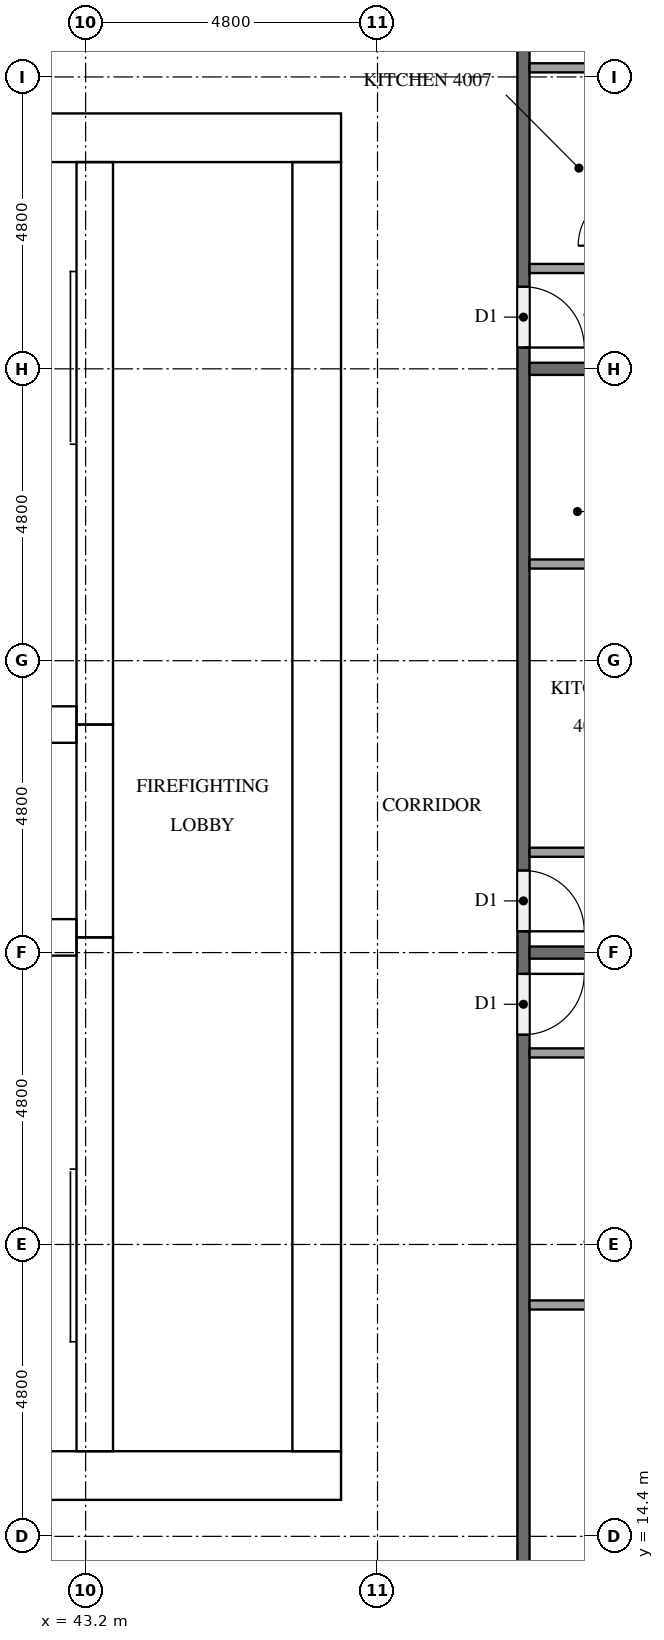
"""IFC4 building model, lengths in metres.
Left out: names, types, materials, properties, quantities, classifications, styles, units other than length and angle.
Written with IfcOpenShell. Run it as: python <this file> out.ifc"""

import sys

from ifc_helpers import new_model, si_unit, direction, frame, frame_2d, origin, place, context, subcontext, project, spatial, rectangle, extrude, element, fill, save


model = new_model("IFC4")
c1 = context("Model", 3, precision=1e-05, world=origin(), true_north=direction((0.0, 1.0)))
c2 = subcontext(c1, "Body", "Model", "MODEL_VIEW")
j1 = project(units=[si_unit("LENGTHUNIT", "METRE"), si_unit("PLANEANGLEUNIT", "RADIAN")], contexts=[c1])
p1 = place(None, origin())
s1 = spatial("IfcSite", under=j1, at=p1, CompositionType="ELEMENT")
p2 = place(p1, origin())
s2 = spatial("IfcBuilding", under=s1, at=p2, CompositionType="ELEMENT")
p3 = place(p2, frame((0.0, 0.0, 156.0)))
s3 = spatial("IfcBuildingStorey", under=s2, at=p3, CompositionType="ELEMENT", Elevation=156.0)
p4 = place(p3, frame((15.0, 15.4, 0.0), z_axis=(0.0, 0.0, 1.0), x_axis=(1.0, 0.0, 0.0)))
e1 = element("IfcWall", 1, at=p4, inside=s3, PredefinedType="SHEAR", context=c2, shape_type="SweptSolid", body=[
    extrude(rectangle(XDim=32.4, YDim=0.8, at=frame_2d((16.2, 0.0))), origin(), (0.0, 0.0, 1.0), 3.2),
])
p5 = place(p4, frame((15.3, 0.0, 0.0)))
e2 = element("IfcOpeningElement", 2, at=p5, cuts=e1, PredefinedType="OPENING", context=c2, shape_type="SweptSolid", body=[
    extrude(rectangle(XDim=1.8, YDim=2.1, at=frame_2d((0.9, 1.05))), frame((0.0, 0.41, 0.0), z_axis=(0.0, -1.0, 0.0), x_axis=(1.0, 0.0, 0.0)), (0.0, 0.0, 1.0), 0.82),
])
p6 = place(p3, frame((15.0, 37.4, 0.0), z_axis=(0.0, 0.0, 1.0), x_axis=(1.0, 0.0, 0.0)))
e3 = element("IfcWall", 3, at=p6, inside=s3, PredefinedType="SHEAR", context=c2, shape_type="SweptSolid", body=[
    extrude(rectangle(XDim=32.4, YDim=0.8, at=frame_2d((16.2, 0.0))), origin(), (0.0, 0.0, 1.0), 3.2),
])
p7 = place(p6, frame((15.3, 0.0, 0.0)))
e4 = element("IfcOpeningElement", 4, at=p7, cuts=e3, PredefinedType="OPENING", context=c2, shape_type="SweptSolid", body=[
    extrude(rectangle(XDim=1.8, YDim=2.1, at=frame_2d((0.9, 1.05))), frame((0.0, 0.41, 0.0), z_axis=(0.0, -1.0, 0.0), x_axis=(1.0, 0.0, 0.0)), (0.0, 0.0, 1.0), 0.82),
])
p8 = place(p6, frame((1.51, 0.0, 0.0)))
e5 = element("IfcOpeningElement", 5, at=p8, cuts=e3, PredefinedType="OPENING", context=c2, shape_type="SweptSolid", body=[
    extrude(rectangle(XDim=1.0, YDim=2.1, at=frame_2d((0.5, 1.05))), frame((0.0, 0.41, 0.0), z_axis=(0.0, -1.0, 0.0), x_axis=(1.0, 0.0, 0.0)), (0.0, 0.0, 1.0), 0.82),
])
p9 = place(p6, frame((5.11, 0.0, 0.0)))
e6 = element("IfcOpeningElement", 6, at=p9, cuts=e3, PredefinedType="OPENING", context=c2, shape_type="SweptSolid", body=[
    extrude(rectangle(XDim=1.0, YDim=2.1, at=frame_2d((0.5, 1.05))), frame((0.0, 0.41, 0.0), z_axis=(0.0, -1.0, 0.0), x_axis=(1.0, 0.0, 0.0)), (0.0, 0.0, 1.0), 0.82),
])
p10 = place(p3, frame((47.0, 15.8, 0.0), z_axis=(0.0, 0.0, 1.0), x_axis=(0.0, 1.0, 0.0)))
e7 = element("IfcWall", 7, at=p10, inside=s3, PredefinedType="SHEAR", context=c2, shape_type="SweptSolid", body=[
    extrude(rectangle(XDim=21.2, YDim=0.8, at=frame_2d((10.6, 0.0))), origin(), (0.0, 0.0, 1.0), 3.2),
])
p11 = place(p10, frame((10.3, 0.0, 0.0)))
e8 = element("IfcOpeningElement", 8, at=p11, cuts=e7, PredefinedType="OPENING", context=c2, shape_type="SweptSolid", body=[
    extrude(rectangle(XDim=1.2, YDim=2.1, at=frame_2d((0.6, 1.05))), frame((0.0, 0.41, 0.0), z_axis=(0.0, -1.0, 0.0), x_axis=(1.0, 0.0, 0.0)), (0.0, 0.0, 1.0), 0.82),
])
p12 = place(p3, frame((43.35, 15.8, 0.0), z_axis=(0.0, 0.0, 1.0), x_axis=(0.0, 1.0, 0.0)))
e9 = element("IfcWall", 9, at=p12, inside=s3, PredefinedType="SHEAR", context=c2, shape_type="SweptSolid", body=[
    extrude(rectangle(XDim=8.45, YDim=0.6, at=frame_2d((4.225, 0.0))), origin(), (0.0, 0.0, 1.0), 3.2),
])
p13 = place(p12, frame((0.4, 0.0, 0.0)))
e10 = element("IfcOpeningElement", 10, at=p13, cuts=e9, PredefinedType="OPENING", context=c2, shape_type="SweptSolid", body=[
    extrude(rectangle(XDim=1.2, YDim=2.1, at=frame_2d((0.6, 1.05))), frame((0.0, 0.31, 0.0), z_axis=(0.0, -1.0, 0.0), x_axis=(1.0, 0.0, 0.0)), (0.0, 0.0, 1.0), 0.62),
])
p14 = place(p3, frame((43.35, 24.25, 0.0), z_axis=(0.0, 0.0, 1.0), x_axis=(0.0, 1.0, 0.0)))
e11 = element("IfcWall", 11, at=p14, inside=s3, PredefinedType="SHEAR", context=c2, shape_type="SweptSolid", body=[
    extrude(rectangle(XDim=3.5, YDim=0.6, at=frame_2d((1.75, 0.0))), origin(), (0.0, 0.0, 1.0), 3.2),
])
p15 = place(p14, frame((1.2, 0.0, 0.0)))
e12 = element("IfcOpeningElement", 12, at=p15, cuts=e11, PredefinedType="OPENING", context=c2, shape_type="SweptSolid", body=[
    extrude(rectangle(XDim=1.1, YDim=2.1, at=frame_2d((0.55, 1.05))), frame((0.0, 0.31, 0.0), z_axis=(0.0, -1.0, 0.0), x_axis=(1.0, 0.0, 0.0)), (0.0, 0.0, 1.0), 0.62),
])
p16 = place(p3, frame((43.35, 27.75, 0.0), z_axis=(0.0, 0.0, 1.0), x_axis=(0.0, 1.0, 0.0)))
e13 = element("IfcWall", 13, at=p16, inside=s3, PredefinedType="SHEAR", context=c2, shape_type="SweptSolid", body=[
    extrude(rectangle(XDim=9.25, YDim=0.6, at=frame_2d((4.625, 0.0))), origin(), (0.0, 0.0, 1.0), 3.2),
])
p17 = place(p16, frame((7.65, 0.0, 0.0)))
e14 = element("IfcOpeningElement", 14, at=p17, cuts=e13, PredefinedType="OPENING", context=c2, shape_type="SweptSolid", body=[
    extrude(rectangle(XDim=1.2, YDim=2.1, at=frame_2d((0.6, 1.05))), frame((0.0, 0.31, 0.0), z_axis=(0.0, -1.0, 0.0), x_axis=(1.0, 0.0, 0.0)), (0.0, 0.0, 1.0), 0.62),
])
for number, where, z_axis, x_axis in (
    (15, (39.6, 24.25, 0.0), (0.0, 0.0, 1.0), (1.0, 0.0, 0.0)),
    (16, (39.6, 27.75, 0.0), (0.0, 0.0, 1.0), (1.0, 0.0, 0.0)),
):
    element("IfcWall", number, at=place(p3, frame(where, z_axis=z_axis, x_axis=x_axis)), inside=s3, PredefinedType="SHEAR", context=c2, shape_type="SweptSolid", body=[
        extrude(rectangle(XDim=3.45, YDim=0.6, at=frame_2d((1.725, 0.0))), origin(), (0.0, 0.0, 1.0), 3.2),
    ])
p18 = place(p3, frame((50.4, 40.7, 0.0), z_axis=(0.0, 0.0, 1.0), x_axis=(0.0, -1.0, 0.0)))
e17 = element("IfcWall", 17, at=p18, inside=s3, PredefinedType="PARTITIONING", context=c2, shape_type="SweptSolid", body=[
    extrude(rectangle(XDim=28.6, YDim=0.2, at=frame_2d((14.3, 0.0))), origin(), (0.0, 0.0, 1.0), 3.2),
])
p19 = place(p18, frame((17.05, 0.0, 0.0)))
e18 = element("IfcOpeningElement", 18, at=p19, cuts=e17, PredefinedType="OPENING", context=c2, shape_type="SweptSolid", body=[
    extrude(rectangle(XDim=1.0, YDim=2.1, at=frame_2d((0.5, 1.05))), frame((0.0, 0.11, 0.0), z_axis=(0.0, -1.0, 0.0), x_axis=(1.0, 0.0, 0.0)), (0.0, 0.0, 1.0), 0.22),
])
p20 = place(p18, frame((15.35, 0.0, 0.0)))
e19 = element("IfcOpeningElement", 19, at=p20, cuts=e17, PredefinedType="OPENING", context=c2, shape_type="SweptSolid", body=[
    extrude(rectangle(XDim=1.0, YDim=2.1, at=frame_2d((0.5, 1.05))), frame((0.0, 0.11, 0.0), z_axis=(0.0, -1.0, 0.0), x_axis=(1.0, 0.0, 0.0)), (0.0, 0.0, 1.0), 0.22),
])
p21 = place(p18, frame((5.75, 0.0, 0.0)))
e20 = element("IfcOpeningElement", 20, at=p21, cuts=e17, PredefinedType="OPENING", context=c2, shape_type="SweptSolid", body=[
    extrude(rectangle(XDim=1.0, YDim=2.1, at=frame_2d((0.5, 1.05))), frame((0.0, 0.11, 0.0), z_axis=(0.0, -1.0, 0.0), x_axis=(1.0, 0.0, 0.0)), (0.0, 0.0, 1.0), 0.22),
])
for number, where, z_axis, x_axis in (
    (21, (50.5, 24.0, 0.0), (0.0, 0.0, 1.0), (1.0, 0.0, 0.0)),
    (22, (50.5, 33.6, 0.0), (0.0, 0.0, 1.0), (1.0, 0.0, 0.0)),
):
    element("IfcWall", number, at=place(p3, frame(where, z_axis=z_axis, x_axis=x_axis)), inside=s3, PredefinedType="PARTITIONING", context=c2, shape_type="SweptSolid", body=[
        extrude(rectangle(XDim=6.725, YDim=0.2, at=frame_2d((3.363, 0.0))), origin(), (0.0, 0.0, 1.0), 3.2),
    ])
p22 = place(p3, frame((50.5, 18.205, 0.0), z_axis=(0.0, 0.0, 1.0), x_axis=(1.0, 0.0, 0.0)))
e23 = element("IfcWall", 23, at=p22, inside=s3, PredefinedType="PARTITIONING", context=c2, shape_type="SweptSolid", body=[
    extrude(rectangle(XDim=1.925, YDim=0.15, at=frame_2d((0.962, 0.0))), origin(), (0.0, 0.0, 1.0), 3.2),
])
for number, where, z_axis, x_axis in (
    (24, (50.5, 22.35, 0.0), (0.0, 0.0, 1.0), (1.0, 0.0, 0.0)),
    (25, (50.5, 30.39, 0.0), (0.0, 0.0, 1.0), (1.0, 0.0, 0.0)),
):
    element("IfcWall", number, at=place(p3, frame(where, z_axis=z_axis, x_axis=x_axis)), inside=s3, PredefinedType="PARTITIONING", context=c2, shape_type="SweptSolid", body=[
        extrude(rectangle(XDim=2.075, YDim=0.15, at=frame_2d((1.038, 0.0))), origin(), (0.0, 0.0, 1.0), 3.2),
    ])
p23 = place(p3, frame((50.5, 25.65, 0.0), z_axis=(0.0, 0.0, 1.0), x_axis=(1.0, 0.0, 0.0)))
e26 = element("IfcWall", 26, at=p23, inside=s3, PredefinedType="PARTITIONING", context=c2, shape_type="SweptSolid", body=[
    extrude(rectangle(XDim=2.225, YDim=0.15, at=frame_2d((1.113, 0.0))), origin(), (0.0, 0.0, 1.0), 3.2),
])
p24 = place(p3, frame((50.5, 38.55, 0.0), z_axis=(0.0, 0.0, 1.0), x_axis=(1.0, 0.0, 0.0)))
e27 = element("IfcWall", 27, at=p24, inside=s3, PredefinedType="PARTITIONING", context=c2, shape_type="SweptSolid", body=[
    extrude(rectangle(XDim=1.625, YDim=0.15, at=frame_2d((0.812, 0.0))), origin(), (0.0, 0.0, 1.0), 3.2),
])
p25 = place(p3, frame((50.5, 35.25, 0.0), z_axis=(0.0, 0.0, 1.0), x_axis=(1.0, 0.0, 0.0)))
e28 = element("IfcWall", 28, at=p25, inside=s3, PredefinedType="PARTITIONING", context=c2, shape_type="SweptSolid", body=[
    extrude(rectangle(XDim=1.775, YDim=0.15, at=frame_2d((0.887, 0.0))), origin(), (0.0, 0.0, 1.0), 3.2),
])
p26 = place(p15, origin())
e29 = element("IfcDoor", 29, at=p26, inside=s3, OperationType="DOUBLE_DOOR_SLIDING", PredefinedType="DOOR", context=c2, shape_type="SweptSolid", body=[
    extrude(rectangle(XDim=1.1, YDim=2.1, at=frame_2d((0.55, 1.05))), frame((0.0, 0.025, 0.0), z_axis=(0.0, -1.0, 0.0), x_axis=(1.0, 0.0, 0.0)), (0.0, 0.0, 1.0), 0.05),
])
fill(e12, e29)
p27 = place(p13, origin())
e30 = element("IfcDoor", 30, at=p27, inside=s3, OperationType="SINGLE_SWING_LEFT", PredefinedType="DOOR", context=c2, shape_type="SweptSolid", body=[
    extrude(rectangle(XDim=1.2, YDim=2.1, at=frame_2d((0.6, 1.05))), frame((0.0, 0.025, 0.0), z_axis=(0.0, -1.0, 0.0), x_axis=(1.0, 0.0, 0.0)), (0.0, 0.0, 1.0), 0.05),
])
fill(e10, e30)
p28 = place(p17, origin())
e31 = element("IfcDoor", 31, at=p28, inside=s3, OperationType="SINGLE_SWING_RIGHT", PredefinedType="DOOR", context=c2, shape_type="SweptSolid", body=[
    extrude(rectangle(XDim=1.2, YDim=2.1, at=frame_2d((0.6, 1.05))), frame((0.0, 0.025, 0.0), z_axis=(0.0, -1.0, 0.0), x_axis=(1.0, 0.0, 0.0)), (0.0, 0.0, 1.0), 0.05),
])
fill(e14, e31)
p29 = place(p11, origin())
e32 = element("IfcDoor", 32, at=p29, inside=s3, OperationType="SINGLE_SWING_RIGHT", PredefinedType="DOOR", context=c2, shape_type="SweptSolid", body=[
    extrude(rectangle(XDim=1.2, YDim=2.1, at=frame_2d((0.6, 1.05))), frame((0.0, 0.025, 0.0), z_axis=(0.0, -1.0, 0.0), x_axis=(1.0, 0.0, 0.0)), (0.0, 0.0, 1.0), 0.05),
])
fill(e8, e32)
p30 = place(p19, origin())
e33 = element("IfcDoor", 33, at=p30, inside=s3, OperationType="SINGLE_SWING_LEFT", PredefinedType="DOOR", context=c2, shape_type="SweptSolid", body=[
    extrude(rectangle(XDim=1.0, YDim=2.1, at=frame_2d((0.5, 1.05))), frame((0.0, 0.025, 0.0), z_axis=(0.0, -1.0, 0.0), x_axis=(1.0, 0.0, 0.0)), (0.0, 0.0, 1.0), 0.05),
])
fill(e18, e33)
p31 = place(p20, origin())
e34 = element("IfcDoor", 34, at=p31, inside=s3, OperationType="SINGLE_SWING_RIGHT", PredefinedType="DOOR", context=c2, shape_type="SweptSolid", body=[
    extrude(rectangle(XDim=1.0, YDim=2.1, at=frame_2d((0.5, 1.05))), frame((0.0, 0.025, 0.0), z_axis=(0.0, -1.0, 0.0), x_axis=(1.0, 0.0, 0.0)), (0.0, 0.0, 1.0), 0.05),
])
fill(e19, e34)
p32 = place(p21, origin())
e35 = element("IfcDoor", 35, at=p32, inside=s3, OperationType="SINGLE_SWING_RIGHT", PredefinedType="DOOR", context=c2, shape_type="SweptSolid", body=[
    extrude(rectangle(XDim=1.0, YDim=2.1, at=frame_2d((0.5, 1.05))), frame((0.0, 0.025, 0.0), z_axis=(0.0, -1.0, 0.0), x_axis=(1.0, 0.0, 0.0)), (0.0, 0.0, 1.0), 0.05),
])
fill(e20, e35)
save(model, sys.argv[1])
